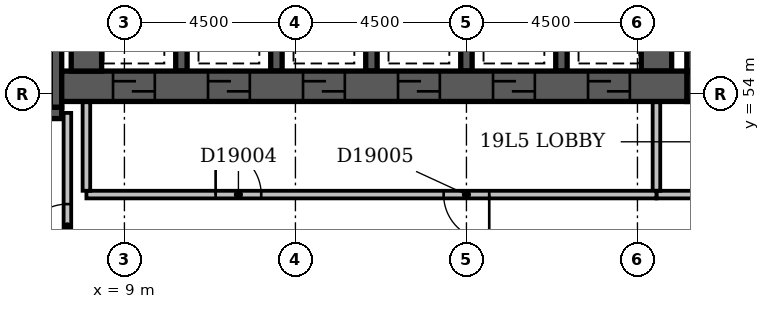
"""IFC4 building model, lengths in metres.
Left out: names, types, materials, properties, quantities, classifications, styles, units other than length and angle.
Written with IfcOpenShell. Run it as: python <this file> out.ifc"""

import sys

from ifc_helpers import new_model, si_unit, direction, frame, frame_2d, origin, place, context, subcontext, project, spatial, rectangle, extrude, element, fill, save


model = new_model("IFC4")
c1 = context("Model", 3, precision=1e-05, world=origin(), true_north=direction((0.0, 1.0)))
c2 = subcontext(c1, "Body", "Model", "MODEL_VIEW")
j1 = project(units=[si_unit("LENGTHUNIT", "METRE"), si_unit("PLANEANGLEUNIT", "RADIAN")], contexts=[c1])
p1 = place(None, origin())
s1 = spatial("IfcSite", under=j1, at=p1, CompositionType="ELEMENT")
p2 = place(p1, origin())
s2 = spatial("IfcBuilding", under=s1, at=p2, CompositionType="ELEMENT")
p3 = place(p2, frame((0.0, 0.0, 79.4)))
s3 = spatial("IfcBuildingStorey", under=s2, at=p3, CompositionType="ELEMENT", Elevation=79.4)
p4 = place(p3, frame((0.35, 53.5, -0.3), z_axis=(0.0, 0.0, 1.0), x_axis=(1.0, 0.0, 0.0)))
e1 = element("IfcWall", 1, at=p4, inside=s3, PredefinedType="SHEAR", context=c2, shape_type="SweptSolid", body=[
    extrude(rectangle(XDim=7.0, YDim=0.3, at=frame_2d((3.5, 0.0))), origin(), (0.0, 0.0, 1.0), 3.6),
])
p5 = place(p4, frame((5.58, 0.0, 0.3)))
e2 = element("IfcOpeningElement", 2, at=p5, cuts=e1, PredefinedType="OPENING", context=c2, shape_type="SweptSolid", body=[
    extrude(rectangle(XDim=1.1, YDim=2.1, at=frame_2d((0.55, 1.05))), frame((0.0, 0.162, 0.0), z_axis=(0.0, -1.0, 0.0), x_axis=(1.0, 0.0, 0.0)), (0.0, 0.0, 1.0), 0.324),
])
p6 = place(p3, frame((7.2, 53.65, -0.3), z_axis=(0.0, 0.0, 1.0), x_axis=(0.0, 1.0, 0.0)))
e3 = element("IfcWall", 3, at=p6, inside=s3, PredefinedType="SHEAR", context=c2, shape_type="SweptSolid", body=[
    extrude(rectangle(XDim=4.2, YDim=0.3, at=frame_2d((2.1, 0.0))), origin(), (0.0, 0.0, 1.0), 3.6),
])
p7 = place(p3, frame((7.35, 54.2, -0.3), z_axis=(0.0, 0.0, 1.0), x_axis=(1.0, 0.0, 0.0)))
e4 = element("IfcWall", 4, at=p7, inside=s3, PredefinedType="SHEAR", context=c2, shape_type="SweptSolid", body=[
    extrude(rectangle(XDim=16.45, YDim=0.8, at=frame_2d((8.225, 0.0))), origin(), (0.0, 0.0, 1.0), 3.6),
])
p8 = place(p7, frame((1.35, 0.0, 0.3)))
e5 = element("IfcOpeningElement", 5, at=p8, cuts=e4, PredefinedType="OPENING", context=c2, shape_type="SweptSolid", body=[
    extrude(rectangle(XDim=1.1, YDim=2.1, at=frame_2d((0.55, 1.05))), frame((0.0, 0.412, 0.0), z_axis=(0.0, -1.0, 0.0), x_axis=(1.0, 0.0, 0.0)), (0.0, 0.0, 1.0), 0.824),
])
p9 = place(p7, frame((3.85, 0.0, 0.3)))
e6 = element("IfcOpeningElement", 6, at=p9, cuts=e4, PredefinedType="OPENING", context=c2, shape_type="SweptSolid", body=[
    extrude(rectangle(XDim=1.1, YDim=2.1, at=frame_2d((0.55, 1.05))), frame((0.0, 0.412, 0.0), z_axis=(0.0, -1.0, 0.0), x_axis=(1.0, 0.0, 0.0)), (0.0, 0.0, 1.0), 0.824),
])
p10 = place(p7, frame((6.35, 0.0, 0.3)))
e7 = element("IfcOpeningElement", 7, at=p10, cuts=e4, PredefinedType="OPENING", context=c2, shape_type="SweptSolid", body=[
    extrude(rectangle(XDim=1.1, YDim=2.1, at=frame_2d((0.55, 1.05))), frame((0.0, 0.412, 0.0), z_axis=(0.0, -1.0, 0.0), x_axis=(1.0, 0.0, 0.0)), (0.0, 0.0, 1.0), 0.824),
])
p11 = place(p7, frame((8.85, 0.0, 0.3)))
e8 = element("IfcOpeningElement", 8, at=p11, cuts=e4, PredefinedType="OPENING", context=c2, shape_type="SweptSolid", body=[
    extrude(rectangle(XDim=1.1, YDim=2.1, at=frame_2d((0.55, 1.05))), frame((0.0, 0.412, 0.0), z_axis=(0.0, -1.0, 0.0), x_axis=(1.0, 0.0, 0.0)), (0.0, 0.0, 1.0), 0.824),
])
p12 = place(p7, frame((11.35, 0.0, 0.3)))
e9 = element("IfcOpeningElement", 9, at=p12, cuts=e4, PredefinedType="OPENING", context=c2, shape_type="SweptSolid", body=[
    extrude(rectangle(XDim=1.1, YDim=2.1, at=frame_2d((0.55, 1.05))), frame((0.0, 0.412, 0.0), z_axis=(0.0, -1.0, 0.0), x_axis=(1.0, 0.0, 0.0)), (0.0, 0.0, 1.0), 0.824),
])
p13 = place(p7, frame((13.85, 0.0, 0.3)))
e10 = element("IfcOpeningElement", 10, at=p13, cuts=e4, PredefinedType="OPENING", context=c2, shape_type="SweptSolid", body=[
    extrude(rectangle(XDim=1.1, YDim=2.1, at=frame_2d((0.55, 1.05))), frame((0.0, 0.412, 0.0), z_axis=(0.0, -1.0, 0.0), x_axis=(1.0, 0.0, 0.0)), (0.0, 0.0, 1.0), 0.824),
])
p14 = place(p3, frame((8.0, 54.6, -0.3), z_axis=(0.0, 0.0, 1.0), x_axis=(0.0, 1.0, 0.0)))
e11 = element("IfcWall", 11, at=p14, inside=s3, PredefinedType="SHEAR", context=c2, shape_type="SweptSolid", body=[
    extrude(rectangle(XDim=3.0, YDim=0.8, at=frame_2d((1.5, 0.0))), origin(), (0.0, 0.0, 1.0), 3.6),
])
for number, where, z_axis, x_axis in (
    (12, (10.5, 54.6, -0.3), (0.0, 0.0, 1.0), (0.0, 1.0, 0.0)),
    (13, (13.0, 54.6, -0.3), (0.0, 0.0, 1.0), (0.0, 1.0, 0.0)),
    (14, (15.5, 54.6, -0.3), (0.0, 0.0, 1.0), (0.0, 1.0, 0.0)),
    (15, (18.0, 54.6, -0.3), (0.0, 0.0, 1.0), (0.0, 1.0, 0.0)),
    (16, (20.5, 54.6, -0.3), (0.0, 0.0, 1.0), (0.0, 1.0, 0.0)),
):
    element("IfcWall", number, at=place(p3, frame(where, z_axis=z_axis, x_axis=x_axis)), inside=s3, PredefinedType="SHEAR", context=c2, shape_type="SweptSolid", body=[
        extrude(rectangle(XDim=3.0, YDim=0.3, at=frame_2d((1.5, 0.0))), origin(), (0.0, 0.0, 1.0), 3.6),
    ])
p15 = place(p3, frame((23.0, 54.6, -0.3), z_axis=(0.0, 0.0, 1.0), x_axis=(0.0, 1.0, 0.0)))
e17 = element("IfcWall", 17, at=p15, inside=s3, PredefinedType="SHEAR", context=c2, shape_type="SweptSolid", body=[
    extrude(rectangle(XDim=3.0, YDim=0.8, at=frame_2d((1.5, 0.0))), origin(), (0.0, 0.0, 1.0), 3.6),
])
p16 = place(p3, frame((23.8, 54.2, -0.3), z_axis=(0.0, 0.0, 1.0), x_axis=(1.0, 0.0, 0.0)))
e18 = element("IfcWall", 18, at=p16, inside=s3, PredefinedType="SHEAR", context=c2, shape_type="SweptSolid", body=[
    extrude(rectangle(XDim=3.3, YDim=0.8, at=frame_2d((1.65, 0.0))), origin(), (0.0, 0.0, 1.0), 3.6),
])
p17 = place(p16, frame((1.1, 0.0, 0.3)))
e19 = element("IfcOpeningElement", 19, at=p17, cuts=e18, PredefinedType="OPENING", context=c2, shape_type="SweptSolid", body=[
    extrude(rectangle(XDim=1.1, YDim=2.1, at=frame_2d((0.55, 1.05))), frame((0.0, 0.412, 0.0), z_axis=(0.0, -1.0, 0.0), x_axis=(1.0, 0.0, 0.0)), (0.0, 0.0, 1.0), 0.824),
])
p18 = place(p3, frame((24.2, 54.6, -0.3), z_axis=(0.0, 0.0, 1.0), x_axis=(0.0, 1.0, 0.0)))
e20 = element("IfcWall", 20, at=p18, inside=s3, PredefinedType="SHEAR", context=c2, shape_type="SweptSolid", body=[
    extrude(rectangle(XDim=3.0, YDim=0.8, at=frame_2d((1.5, 0.0))), origin(), (0.0, 0.0, 1.0), 3.6),
])
p19 = place(p3, frame((8.0, 51.35, 0.0), z_axis=(0.0, 0.0, 1.0), x_axis=(1.0, 0.0, 0.0)))
e21 = element("IfcWall", 21, at=p19, inside=s3, PredefinedType="PARTITIONING", context=c2, shape_type="SweptSolid", body=[
    extrude(rectangle(XDim=15.0, YDim=0.2, at=frame_2d((7.5, 0.0))), origin(), (0.0, 0.0, 1.0), 3.3),
])
p20 = place(p19, frame((3.4, 0.0, 0.0)))
e22 = element("IfcOpeningElement", 22, at=p20, cuts=e21, PredefinedType="OPENING", context=c2, shape_type="SweptSolid", body=[
    extrude(rectangle(XDim=1.2, YDim=2.1, at=frame_2d((0.6, 1.05))), frame((0.0, 0.112, 0.0), z_axis=(0.0, -1.0, 0.0), x_axis=(1.0, 0.0, 0.0)), (0.0, 0.0, 1.0), 0.224),
])
p21 = place(p19, frame((9.4, 0.0, 0.0)))
e23 = element("IfcOpeningElement", 23, at=p21, cuts=e21, PredefinedType="OPENING", context=c2, shape_type="SweptSolid", body=[
    extrude(rectangle(XDim=1.2, YDim=2.1, at=frame_2d((0.6, 1.05))), frame((0.0, 0.112, 0.0), z_axis=(0.0, -1.0, 0.0), x_axis=(1.0, 0.0, 0.0)), (0.0, 0.0, 1.0), 0.224),
])
for number, where, z_axis, x_axis in (
    (24, (23.0, 51.45, 0.0), (0.0, 0.0, 1.0), (0.0, 1.0, 0.0)),
    (25, (8.0, 51.45, 0.0), (0.0, 0.0, 1.0), (0.0, 1.0, 0.0)),
):
    element("IfcWall", number, at=place(p3, frame(where, z_axis=z_axis, x_axis=x_axis)), inside=s3, PredefinedType="PARTITIONING", context=c2, shape_type="SweptSolid", body=[
        extrude(rectangle(XDim=2.33, YDim=0.2, at=frame_2d((1.165, 0.0))), origin(), (0.0, 0.0, 1.0), 3.3),
    ])
p22 = place(p3, frame((23.0, 51.35, 0.0), z_axis=(0.0, 0.0, 1.0), x_axis=(1.0, 0.0, 0.0)))
e26 = element("IfcWall", 26, at=p22, inside=s3, PredefinedType="PARTITIONING", context=c2, shape_type="SweptSolid", body=[
    extrude(rectangle(XDim=4.8, YDim=0.2, at=frame_2d((2.4, 0.0))), origin(), (0.0, 0.0, 1.0), 3.3),
])
p23 = place(p22, frame((1.65, 0.0, 0.0)))
e27 = element("IfcOpeningElement", 27, at=p23, cuts=e26, PredefinedType="OPENING", context=c2, shape_type="SweptSolid", body=[
    extrude(rectangle(XDim=1.2, YDim=2.1, at=frame_2d((0.6, 1.05))), frame((0.0, 0.112, 0.0), z_axis=(0.0, -1.0, 0.0), x_axis=(1.0, 0.0, 0.0)), (0.0, 0.0, 1.0), 0.224),
])
p24 = place(p3, frame((7.5, 49.6, 0.0), z_axis=(0.0, 0.0, 1.0), x_axis=(0.0, 1.0, 0.0)))
e28 = element("IfcWall", 28, at=p24, inside=s3, PredefinedType="PARTITIONING", context=c2, shape_type="SweptSolid", body=[
    extrude(rectangle(XDim=3.9, YDim=0.2, at=frame_2d((1.95, 0.0))), origin(), (0.0, 0.0, 1.0), 3.3),
])
p25 = place(p24, frame((0.3, 0.0, 0.0)))
e29 = element("IfcOpeningElement", 29, at=p25, cuts=e28, PredefinedType="OPENING", context=c2, shape_type="SweptSolid", body=[
    extrude(rectangle(XDim=1.2, YDim=2.1, at=frame_2d((0.6, 1.05))), frame((0.0, 0.112, 0.0), z_axis=(0.0, -1.0, 0.0), x_axis=(1.0, 0.0, 0.0)), (0.0, 0.0, 1.0), 0.224),
])
p26 = place(p25, origin())
e30 = element("IfcDoor", 30, at=p26, inside=s3, OperationType="SINGLE_SWING_LEFT", PredefinedType="DOOR", context=c2, shape_type="SweptSolid", body=[
    extrude(rectangle(XDim=1.2, YDim=2.1, at=frame_2d((0.6, 1.05))), frame((0.0, 0.025, 0.0), z_axis=(0.0, -1.0, 0.0), x_axis=(1.0, 0.0, 0.0)), (0.0, 0.0, 1.0), 0.05),
])
fill(e29, e30)
p27 = place(p8, origin())
e31 = element("IfcDoor", 31, at=p27, inside=s3, OperationType="SLIDING_TO_LEFT", PredefinedType="DOOR", context=c2, shape_type="SweptSolid", body=[
    extrude(rectangle(XDim=1.1, YDim=2.1, at=frame_2d((0.55, 1.05))), frame((0.0, 0.025, 0.0), z_axis=(0.0, -1.0, 0.0), x_axis=(1.0, 0.0, 0.0)), (0.0, 0.0, 1.0), 0.05),
])
fill(e5, e31)
p28 = place(p9, origin())
e32 = element("IfcDoor", 32, at=p28, inside=s3, OperationType="SLIDING_TO_LEFT", PredefinedType="DOOR", context=c2, shape_type="SweptSolid", body=[
    extrude(rectangle(XDim=1.1, YDim=2.1, at=frame_2d((0.55, 1.05))), frame((0.0, 0.025, 0.0), z_axis=(0.0, -1.0, 0.0), x_axis=(1.0, 0.0, 0.0)), (0.0, 0.0, 1.0), 0.05),
])
fill(e6, e32)
p29 = place(p10, origin())
e33 = element("IfcDoor", 33, at=p29, inside=s3, OperationType="SLIDING_TO_LEFT", PredefinedType="DOOR", context=c2, shape_type="SweptSolid", body=[
    extrude(rectangle(XDim=1.1, YDim=2.1, at=frame_2d((0.55, 1.05))), frame((0.0, 0.025, 0.0), z_axis=(0.0, -1.0, 0.0), x_axis=(1.0, 0.0, 0.0)), (0.0, 0.0, 1.0), 0.05),
])
fill(e7, e33)
p30 = place(p11, origin())
e34 = element("IfcDoor", 34, at=p30, inside=s3, OperationType="SLIDING_TO_LEFT", PredefinedType="DOOR", context=c2, shape_type="SweptSolid", body=[
    extrude(rectangle(XDim=1.1, YDim=2.1, at=frame_2d((0.55, 1.05))), frame((0.0, 0.025, 0.0), z_axis=(0.0, -1.0, 0.0), x_axis=(1.0, 0.0, 0.0)), (0.0, 0.0, 1.0), 0.05),
])
fill(e8, e34)
p31 = place(p12, origin())
e35 = element("IfcDoor", 35, at=p31, inside=s3, OperationType="SLIDING_TO_LEFT", PredefinedType="DOOR", context=c2, shape_type="SweptSolid", body=[
    extrude(rectangle(XDim=1.1, YDim=2.1, at=frame_2d((0.55, 1.05))), frame((0.0, 0.025, 0.0), z_axis=(0.0, -1.0, 0.0), x_axis=(1.0, 0.0, 0.0)), (0.0, 0.0, 1.0), 0.05),
])
fill(e9, e35)
p32 = place(p13, origin())
e36 = element("IfcDoor", 36, at=p32, inside=s3, OperationType="SLIDING_TO_LEFT", PredefinedType="DOOR", context=c2, shape_type="SweptSolid", body=[
    extrude(rectangle(XDim=1.1, YDim=2.1, at=frame_2d((0.55, 1.05))), frame((0.0, 0.025, 0.0), z_axis=(0.0, -1.0, 0.0), x_axis=(1.0, 0.0, 0.0)), (0.0, 0.0, 1.0), 0.05),
])
fill(e10, e36)
p33 = place(p20, origin())
e37 = element("IfcDoor", 37, at=p33, inside=s3, OperationType="SINGLE_SWING_LEFT", PredefinedType="DOOR", context=c2, shape_type="SweptSolid", body=[
    extrude(rectangle(XDim=1.2, YDim=2.1, at=frame_2d((0.6, 1.05))), frame((0.0, 0.025, 0.0), z_axis=(0.0, -1.0, 0.0), x_axis=(1.0, 0.0, 0.0)), (0.0, 0.0, 1.0), 0.05),
])
fill(e22, e37)
p34 = place(p21, origin())
e38 = element("IfcDoor", 38, at=p34, inside=s3, OperationType="SINGLE_SWING_RIGHT", PredefinedType="DOOR", context=c2, shape_type="SweptSolid", body=[
    extrude(rectangle(XDim=1.2, YDim=2.1, at=frame_2d((0.6, 1.05))), frame((0.0, 0.025, 0.0), z_axis=(0.0, -1.0, 0.0), x_axis=(1.0, 0.0, 0.0)), (0.0, 0.0, 1.0), 0.05),
])
fill(e23, e38)
save(model, sys.argv[1])
